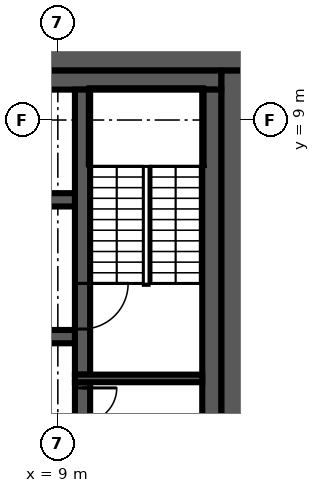
"""IFC4 building model, lengths in metres.
Left out: names, types, materials, properties, quantities, classifications, styles, units other than length and angle.
Written with IfcOpenShell. Run it as: python <this file> out.ifc"""

import sys

from ifc_helpers import new_model, si_unit, direction, frame, frame_2d, origin, place, context, subcontext, project, spatial, rectangle, extrude, element, fill, save


model = new_model("IFC4")
c1 = context("Model", 3, precision=1e-05, world=origin(), true_north=direction((0.0, 1.0)))
c2 = subcontext(c1, "Body", "Model", "MODEL_VIEW")
j1 = project(units=[si_unit("LENGTHUNIT", "METRE"), si_unit("PLANEANGLEUNIT", "RADIAN")], contexts=[c1])
p1 = place(None, origin())
s1 = spatial("IfcSite", under=j1, at=p1, CompositionType="ELEMENT")
p2 = place(p1, origin())
s2 = spatial("IfcBuilding", under=s1, at=p2, CompositionType="ELEMENT")
p3 = place(p2, frame((0.0, 0.0, 258.0)))
s3 = spatial("IfcBuildingStorey", under=s2, at=p3, CompositionType="ELEMENT", Elevation=258.0)
p4 = place(p3, frame((-14.0, 10.65, 0.0), z_axis=(0.0, 0.0, 1.0), x_axis=(1.0, 0.0, 0.0)))
e1 = element("IfcWall", 1, at=p4, inside=s3, PredefinedType="SHEAR", context=c2, shape_type="SweptSolid", body=[
    extrude(rectangle(XDim=28.0, YDim=0.7, at=frame_2d((14.0, 0.0))), origin(), (0.0, 0.0, 1.0), 3.82),
])
p5 = place(p4, frame((15.9, 0.0, 0.0)))
e2 = element("IfcOpeningElement", 2, at=p5, cuts=e1, PredefinedType="OPENING", context=c2, shape_type="SweptSolid", body=[
    extrude(rectangle(XDim=1.6, YDim=2.1, at=frame_2d((0.8, 1.05))), frame((0.0, 0.36, 0.0), z_axis=(0.0, -1.0, 0.0), x_axis=(1.0, 0.0, 0.0)), (0.0, 0.0, 1.0), 0.72),
])
p6 = place(p3, frame((13.65, 10.3, 0.0), z_axis=(0.0, 0.0, 1.0), x_axis=(0.0, -1.0, 0.0)))
e3 = element("IfcWall", 3, at=p6, inside=s3, PredefinedType="SHEAR", context=c2, shape_type="SweptSolid", body=[
    extrude(rectangle(XDim=20.6, YDim=0.7, at=frame_2d((10.3, 0.0))), origin(), (0.0, 0.0, 1.0), 3.82),
])
p7 = place(p3, frame((3.9, 10.05, 0.0), z_axis=(0.0, 0.0, 1.0), x_axis=(1.0, 0.0, 0.0)))
e4 = element("IfcWall", 4, at=p7, inside=s3, PredefinedType="SHEAR", context=c2, shape_type="SweptSolid", body=[
    extrude(rectangle(XDim=9.4, YDim=0.5, at=frame_2d((4.7, 0.0))), origin(), (0.0, 0.0, 1.0), 3.82),
])
p8 = place(p3, frame((13.05, 9.8, 0.0), z_axis=(0.0, 0.0, 1.0), x_axis=(0.0, -1.0, 0.0)))
e5 = element("IfcWall", 5, at=p8, inside=s3, PredefinedType="SHEAR", context=c2, shape_type="SweptSolid", body=[
    extrude(rectangle(XDim=19.6, YDim=0.5, at=frame_2d((9.8, 0.0))), origin(), (0.0, 0.0, 1.0), 3.82),
])
p9 = place(p3, frame((9.65, 2.1, 0.0), z_axis=(0.0, 0.0, 1.0), x_axis=(0.0, -1.0, 0.0)))
e6 = element("IfcWall", 6, at=p9, inside=s3, PredefinedType="SHEAR", context=c2, shape_type="SweptSolid", body=[
    extrude(rectangle(XDim=4.2, YDim=0.4, at=frame_2d((2.1, 0.0))), origin(), (0.0, 0.0, 1.0), 3.82),
])
p10 = place(p9, frame((0.15, 0.0, 0.0)))
e7 = element("IfcOpeningElement", 7, at=p10, cuts=e6, PredefinedType="OPENING", context=c2, shape_type="SweptSolid", body=[
    extrude(rectangle(XDim=0.9, YDim=2.1, at=frame_2d((0.45, 1.05))), frame((0.0, 0.21, 0.0), z_axis=(0.0, -1.0, 0.0), x_axis=(1.0, 0.0, 0.0)), (0.0, 0.0, 1.0), 0.42),
])
p11 = place(p3, frame((9.65, 9.8, 0.0), z_axis=(0.0, 0.0, 1.0), x_axis=(0.0, -1.0, 0.0)))
e8 = element("IfcWall", 8, at=p11, inside=s3, PredefinedType="SHEAR", context=c2, shape_type="SweptSolid", body=[
    extrude(rectangle(XDim=7.5, YDim=0.4, at=frame_2d((3.75, 0.0))), origin(), (0.0, 0.0, 1.0), 3.82),
])
p12 = place(p11, frame((5.1, 0.0, 0.0)))
e9 = element("IfcOpeningElement", 9, at=p12, cuts=e8, PredefinedType="OPENING", context=c2, shape_type="SweptSolid", body=[
    extrude(rectangle(XDim=1.2, YDim=2.1, at=frame_2d((0.6, 1.05))), frame((0.0, 0.21, 0.0), z_axis=(0.0, -1.0, 0.0), x_axis=(1.0, 0.0, 0.0)), (0.0, 0.0, 1.0), 0.42),
])
p13 = place(p3, frame((9.45, 2.2, 0.0), z_axis=(0.0, 0.0, 1.0), x_axis=(1.0, 0.0, 0.0)))
e10 = element("IfcWall", 10, at=p13, inside=s3, PredefinedType="SHEAR", context=c2, shape_type="SweptSolid", body=[
    extrude(rectangle(XDim=3.35, YDim=0.2, at=frame_2d((1.675, 0.0))), origin(), (0.0, 0.0, 1.0), 3.82),
])
p14 = place(p3, frame((-9.45, 6.9, 0.0), z_axis=(0.0, 0.0, 1.0), x_axis=(1.0, 0.0, 0.0)))
e11 = element("IfcWall", 11, at=p14, inside=s3, PredefinedType="SHEAR", context=c2, shape_type="SweptSolid", body=[
    extrude(rectangle(XDim=18.9, YDim=0.35, at=frame_2d((9.45, 0.0))), origin(), (0.0, 0.0, 1.0), 3.82),
])
p15 = place(p14, frame((11.55, 0.0, 0.0)))
e12 = element("IfcOpeningElement", 12, at=p15, cuts=e11, PredefinedType="OPENING", context=c2, shape_type="SweptSolid", body=[
    extrude(rectangle(XDim=1.2, YDim=2.1, at=frame_2d((0.6, 1.05))), frame((0.0, 0.185, 0.0), z_axis=(0.0, -1.0, 0.0), x_axis=(1.0, 0.0, 0.0)), (0.0, 0.0, 1.0), 0.37),
])
p16 = place(p14, frame((14.3, 0.0, 0.0)))
e13 = element("IfcOpeningElement", 13, at=p16, cuts=e11, PredefinedType="OPENING", context=c2, shape_type="SweptSolid", body=[
    extrude(rectangle(XDim=1.1, YDim=2.1, at=frame_2d((0.55, 1.05))), frame((0.0, 0.185, 0.0), z_axis=(0.0, -1.0, 0.0), x_axis=(1.0, 0.0, 0.0)), (0.0, 0.0, 1.0), 0.37),
])
p17 = place(p14, frame((17.0, 0.0, 0.0)))
e14 = element("IfcOpeningElement", 14, at=p17, cuts=e11, PredefinedType="OPENING", context=c2, shape_type="SweptSolid", body=[
    extrude(rectangle(XDim=1.1, YDim=2.1, at=frame_2d((0.55, 1.05))), frame((0.0, 0.185, 0.0), z_axis=(0.0, -1.0, 0.0), x_axis=(1.0, 0.0, 0.0)), (0.0, 0.0, 1.0), 0.37),
])
p18 = place(p14, frame((0.9, 0.0, 0.0)))
e15 = element("IfcOpeningElement", 15, at=p18, cuts=e11, PredefinedType="OPENING", context=c2, shape_type="SweptSolid", body=[
    extrude(rectangle(XDim=0.9, YDim=2.1, at=frame_2d((0.45, 1.05))), frame((0.0, 0.185, 0.0), z_axis=(0.0, -1.0, 0.0), x_axis=(1.0, 0.0, 0.0)), (0.0, 0.0, 1.0), 0.37),
])
p19 = place(p14, frame((6.3, 0.0, 0.0)))
e16 = element("IfcOpeningElement", 16, at=p19, cuts=e11, PredefinedType="OPENING", context=c2, shape_type="SweptSolid", body=[
    extrude(rectangle(XDim=0.9, YDim=2.1, at=frame_2d((0.45, 1.05))), frame((0.0, 0.185, 0.0), z_axis=(0.0, -1.0, 0.0), x_axis=(1.0, 0.0, 0.0)), (0.0, 0.0, 1.0), 0.37),
])
p20 = place(p3, frame((9.45, 3.3, 0.0), z_axis=(0.0, 0.0, 1.0), x_axis=(-1.0, 0.0, 0.0)))
e17 = element("IfcWall", 17, at=p20, inside=s3, PredefinedType="SHEAR", context=c2, shape_type="SweptSolid", body=[
    extrude(rectangle(XDim=18.9, YDim=0.35, at=frame_2d((9.45, 0.0))), origin(), (0.0, 0.0, 1.0), 3.82),
])
p21 = place(p20, frame((6.2, 0.0, 0.0)))
e18 = element("IfcOpeningElement", 18, at=p21, cuts=e17, PredefinedType="OPENING", context=c2, shape_type="SweptSolid", body=[
    extrude(rectangle(XDim=1.1, YDim=2.1, at=frame_2d((0.55, 1.05))), frame((0.0, 0.185, 0.0), z_axis=(0.0, -1.0, 0.0), x_axis=(1.0, 0.0, 0.0)), (0.0, 0.0, 1.0), 0.37),
])
p22 = place(p20, frame((3.5, 0.0, 0.0)))
e19 = element("IfcOpeningElement", 19, at=p22, cuts=e17, PredefinedType="OPENING", context=c2, shape_type="SweptSolid", body=[
    extrude(rectangle(XDim=1.1, YDim=2.1, at=frame_2d((0.55, 1.05))), frame((0.0, 0.185, 0.0), z_axis=(0.0, -1.0, 0.0), x_axis=(1.0, 0.0, 0.0)), (0.0, 0.0, 1.0), 0.37),
])
p23 = place(p20, frame((0.9, 0.0, 0.0)))
e20 = element("IfcOpeningElement", 20, at=p23, cuts=e17, PredefinedType="OPENING", context=c2, shape_type="SweptSolid", body=[
    extrude(rectangle(XDim=0.9, YDim=2.1, at=frame_2d((0.45, 1.05))), frame((0.0, 0.185, 0.0), z_axis=(0.0, -1.0, 0.0), x_axis=(1.0, 0.0, 0.0)), (0.0, 0.0, 1.0), 0.37),
])
p24 = place(p20, frame((14.4, 0.0, 0.0)))
e21 = element("IfcOpeningElement", 21, at=p24, cuts=e17, PredefinedType="OPENING", context=c2, shape_type="SweptSolid", body=[
    extrude(rectangle(XDim=0.9, YDim=2.1, at=frame_2d((0.45, 1.05))), frame((0.0, 0.185, 0.0), z_axis=(0.0, -1.0, 0.0), x_axis=(1.0, 0.0, 0.0)), (0.0, 0.0, 1.0), 0.37),
])
p25 = place(p20, frame((9.0, 0.0, 0.0)))
e22 = element("IfcOpeningElement", 22, at=p25, cuts=e17, PredefinedType="OPENING", context=c2, shape_type="SweptSolid", body=[
    extrude(rectangle(XDim=0.9, YDim=2.1, at=frame_2d((0.45, 1.05))), frame((0.0, 0.185, 0.0), z_axis=(0.0, -1.0, 0.0), x_axis=(1.0, 0.0, 0.0)), (0.0, 0.0, 1.0), 0.37),
])
p26 = place(p10, origin())
e23 = element("IfcDoor", 23, at=p26, inside=s3, OperationType="SINGLE_SWING_RIGHT", PredefinedType="DOOR", context=c2, shape_type="SweptSolid", body=[
    extrude(rectangle(XDim=0.9, YDim=2.1, at=frame_2d((0.45, 1.05))), frame((0.0, 0.025, 0.0), z_axis=(0.0, -1.0, 0.0), x_axis=(1.0, 0.0, 0.0)), (0.0, 0.0, 1.0), 0.05),
])
fill(e7, e23)
p27 = place(p12, origin())
e24 = element("IfcDoor", 24, at=p27, inside=s3, OperationType="SINGLE_SWING_LEFT", PredefinedType="DOOR", context=c2, shape_type="SweptSolid", body=[
    extrude(rectangle(XDim=1.2, YDim=2.1, at=frame_2d((0.6, 1.05))), frame((0.0, 0.025, 0.0), z_axis=(0.0, -1.0, 0.0), x_axis=(1.0, 0.0, 0.0)), (0.0, 0.0, 1.0), 0.05),
])
fill(e9, e24)
save(model, sys.argv[1])
